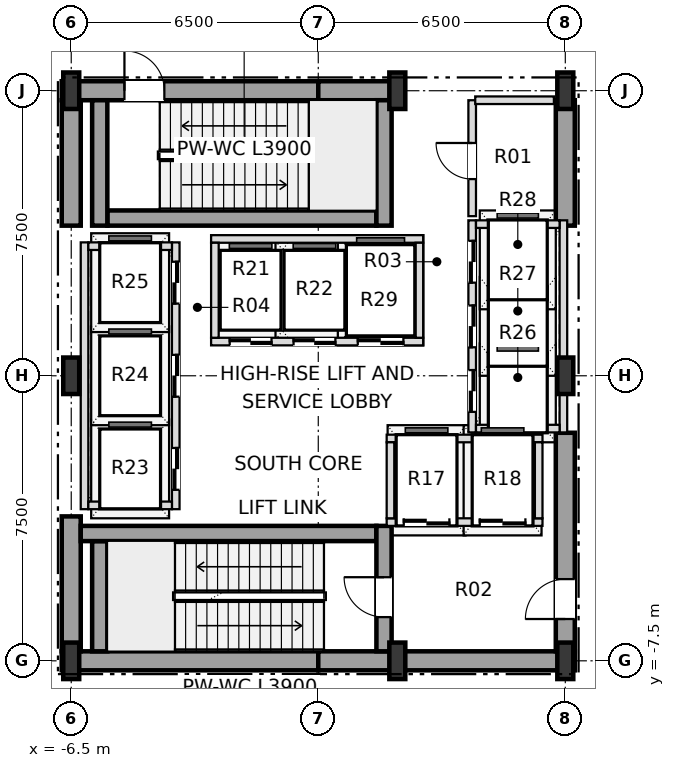
"""IFC4 building model, lengths in metres.
Left out: names, types, materials, properties, quantities, classifications, styles, units other than length and angle.
Written with IfcOpenShell. Run it as: python <this file> out.ifc"""

import sys

from ifc_helpers import new_model, si_unit, direction, frame, frame_2d, origin, origin_2d, place, context, subcontext, project, spatial, rectangle, i_section, extrude, element, fill, save


model = new_model("IFC4")
c1 = context("Model", 3, precision=1e-05, world=origin(), true_north=direction((0.0, 1.0)))
c2 = subcontext(c1, "Body", "Model", "MODEL_VIEW")
j1 = project(units=[si_unit("LENGTHUNIT", "METRE"), si_unit("PLANEANGLEUNIT", "RADIAN")], contexts=[c1])
p1 = place(None, origin())
s1 = spatial("IfcSite", under=j1, at=p1, CompositionType="ELEMENT")
p2 = place(p1, origin())
s2 = spatial("IfcBuilding", under=s1, at=p2, CompositionType="ELEMENT")
p3 = place(p2, frame((0.0, 0.0, 16.8)))
s3 = spatial("IfcBuildingStorey", under=s2, at=p3, CompositionType="ELEMENT", Elevation=16.8)
for number, where, z_axis, x_axis in (
    (1, (-6.5, -7.5, 0.0), (0.0, 0.0, 1.0), (1.0, 0.0, 0.0)),
    (2, (2.08, -7.5, 0.0), (0.0, 0.0, 1.0), (1.0, 0.0, 0.0)),
    (3, (6.5, -7.5, 0.0), (0.0, 0.0, 1.0), (1.0, 0.0, 0.0)),
    (4, (-6.5, 0.0, 0.0), (0.0, 0.0, 1.0), (1.0, 0.0, 0.0)),
    (5, (6.5, 0.0, 0.0), (0.0, 0.0, 1.0), (1.0, 0.0, 0.0)),
    (6, (-6.5, 7.5, 0.0), (0.0, 0.0, 1.0), (1.0, 0.0, 0.0)),
    (7, (2.08, 7.5, 0.0), (0.0, 0.0, 1.0), (1.0, 0.0, 0.0)),
    (8, (6.5, 7.5, 0.0), (0.0, 0.0, 1.0), (1.0, 0.0, 0.0)),
):
    element("IfcColumn", number, at=place(p3, frame(where, z_axis=z_axis, x_axis=x_axis)), inside=s3, PredefinedType="COLUMN", context=c2, shape_type="SweptSolid", body=[
        extrude(i_section(OverallWidth=0.42, OverallDepth=0.96, WebThickness=0.022, FlangeThickness=0.034, at=origin_2d()), origin(), (0.0, 0.0, 1.0), 5.4),
    ])
for number, where, z_axis, x_axis in (
    (9, (-6.75, -7.5, 0.0), (0.0, 0.0, 1.0), (1.0, 0.0, 0.0)),
    (10, (0.0, -7.5, 0.0), (0.0, 0.0, 1.0), (1.0, 0.0, 0.0)),
):
    element("IfcWall", number, at=place(p3, frame(where, z_axis=z_axis, x_axis=x_axis)), inside=s3, PredefinedType="SHEAR", context=c2, shape_type="SweptSolid", body=[
        extrude(rectangle(XDim=6.75, YDim=0.5, at=frame_2d((3.375, 0.0))), origin(), (0.0, 0.0, 1.0), 5.12),
    ])
p4 = place(p3, frame((-6.75, 7.5, 0.0), z_axis=(0.0, 0.0, 1.0), x_axis=(1.0, 0.0, 0.0)))
e11 = element("IfcWall", 11, at=p4, inside=s3, PredefinedType="SHEAR", context=c2, shape_type="SweptSolid", body=[
    extrude(rectangle(XDim=6.75, YDim=0.5, at=frame_2d((3.375, 0.0))), origin(), (0.0, 0.0, 1.0), 5.12),
])
p5 = place(p4, frame((1.65, 0.0, 0.0)))
e12 = element("IfcOpeningElement", 12, at=p5, cuts=e11, PredefinedType="OPENING", context=c2, shape_type="SweptSolid", body=[
    extrude(rectangle(XDim=1.05, YDim=2.15, at=frame_2d((0.525, 1.075))), frame((0.0, 0.26, 0.0), z_axis=(0.0, -1.0, 0.0), x_axis=(1.0, 0.0, 0.0)), (0.0, 0.0, 1.0), 0.52),
])
p6 = place(p3, frame((0.0, 7.5, 0.0), z_axis=(0.0, 0.0, 1.0), x_axis=(1.0, 0.0, 0.0)))
e13 = element("IfcWall", 13, at=p6, inside=s3, PredefinedType="SHEAR", context=c2, shape_type="SweptSolid", body=[
    extrude(rectangle(XDim=2.08, YDim=0.5, at=frame_2d((1.04, 0.0))), origin(), (0.0, 0.0, 1.0), 5.12),
])
p7 = place(p3, frame((-6.5, -7.25, 0.0), z_axis=(0.0, 0.0, 1.0), x_axis=(0.0, 1.0, 0.0)))
e14 = element("IfcWall", 14, at=p7, inside=s3, PredefinedType="SHEAR", context=c2, shape_type="SweptSolid", body=[
    extrude(rectangle(XDim=3.55, YDim=0.5, at=frame_2d((1.775, 0.0))), origin(), (0.0, 0.0, 1.0), 5.12),
])
p8 = place(p3, frame((-6.5, 3.95, 0.0), z_axis=(0.0, 0.0, 1.0), x_axis=(0.0, 1.0, 0.0)))
e15 = element("IfcWall", 15, at=p8, inside=s3, PredefinedType="SHEAR", context=c2, shape_type="SweptSolid", body=[
    extrude(rectangle(XDim=3.3, YDim=0.5, at=frame_2d((1.65, 0.0))), origin(), (0.0, 0.0, 1.0), 5.12),
])
p9 = place(p3, frame((6.5, -7.25, 0.0), z_axis=(0.0, 0.0, 1.0), x_axis=(0.0, 1.0, 0.0)))
e16 = element("IfcWall", 16, at=p9, inside=s3, PredefinedType="SHEAR", context=c2, shape_type="SweptSolid", body=[
    extrude(rectangle(XDim=5.75, YDim=0.5, at=frame_2d((2.875, 0.0))), origin(), (0.0, 0.0, 1.0), 5.12),
])
p10 = place(p9, frame((0.85, 0.0, 0.0)))
e17 = element("IfcOpeningElement", 17, at=p10, cuts=e16, PredefinedType="OPENING", context=c2, shape_type="SweptSolid", body=[
    extrude(rectangle(XDim=1.05, YDim=2.15, at=frame_2d((0.525, 1.075))), frame((0.0, 0.26, 0.0), z_axis=(0.0, -1.0, 0.0), x_axis=(1.0, 0.0, 0.0)), (0.0, 0.0, 1.0), 0.52),
])
p11 = place(p3, frame((6.5, 3.95, 0.0), z_axis=(0.0, 0.0, 1.0), x_axis=(0.0, 1.0, 0.0)))
e18 = element("IfcWall", 18, at=p11, inside=s3, PredefinedType="SHEAR", context=c2, shape_type="SweptSolid", body=[
    extrude(rectangle(XDim=3.3, YDim=0.5, at=frame_2d((1.65, 0.0))), origin(), (0.0, 0.0, 1.0), 5.12),
])
p12 = place(p3, frame((-5.75, -7.25, 0.0), z_axis=(0.0, 0.0, 1.0), x_axis=(0.0, 1.0, 0.0)))
e19 = element("IfcWall", 19, at=p12, inside=s3, PredefinedType="SHEAR", context=c2, shape_type="SweptSolid", body=[
    extrude(rectangle(XDim=2.9, YDim=0.4, at=frame_2d((1.45, 0.0))), origin(), (0.0, 0.0, 1.0), 5.12),
])
p13 = place(p3, frame((-6.25, -4.15, 0.0), z_axis=(0.0, 0.0, 1.0), x_axis=(1.0, 0.0, 0.0)))
e20 = element("IfcWall", 20, at=p13, inside=s3, PredefinedType="SHEAR", context=c2, shape_type="SweptSolid", body=[
    extrude(rectangle(XDim=7.78, YDim=0.4, at=frame_2d((3.89, 0.0))), origin(), (0.0, 0.0, 1.0), 5.12),
])
p14 = place(p3, frame((1.73, -7.25, 0.0), z_axis=(0.0, 0.0, 1.0), x_axis=(0.0, 1.0, 0.0)))
e21 = element("IfcWall", 21, at=p14, inside=s3, PredefinedType="SHEAR", context=c2, shape_type="SweptSolid", body=[
    extrude(rectangle(XDim=3.3, YDim=0.4, at=frame_2d((1.65, 0.0))), origin(), (0.0, 0.0, 1.0), 5.12),
])
p15 = place(p14, frame((0.9, 0.0, 0.0)))
e22 = element("IfcOpeningElement", 22, at=p15, cuts=e21, PredefinedType="OPENING", context=c2, shape_type="SweptSolid", body=[
    extrude(rectangle(XDim=1.05, YDim=2.15, at=frame_2d((0.525, 1.075))), frame((0.0, 0.21, 0.0), z_axis=(0.0, -1.0, 0.0), x_axis=(1.0, 0.0, 0.0)), (0.0, 0.0, 1.0), 0.42),
])
p16 = place(p3, frame((-5.55, 4.15, 0.0), z_axis=(0.0, 0.0, 1.0), x_axis=(1.0, 0.0, 0.0)))
e23 = element("IfcWall", 23, at=p16, inside=s3, PredefinedType="SHEAR", context=c2, shape_type="SweptSolid", body=[
    extrude(rectangle(XDim=7.08, YDim=0.4, at=frame_2d((3.54, 0.0))), origin(), (0.0, 0.0, 1.0), 5.12),
])
for number, where, z_axis, x_axis in (
    (24, (1.73, 3.95, 0.0), (0.0, 0.0, 1.0), (0.0, 1.0, 0.0)),
    (25, (-5.75, 3.95, 0.0), (0.0, 0.0, 1.0), (0.0, 1.0, 0.0)),
):
    element("IfcWall", number, at=place(p3, frame(where, z_axis=z_axis, x_axis=x_axis)), inside=s3, PredefinedType="SHEAR", context=c2, shape_type="SweptSolid", body=[
        extrude(rectangle(XDim=3.3, YDim=0.4, at=frame_2d((1.65, 0.0))), origin(), (0.0, 0.0, 1.0), 5.12),
    ])
p17 = place(p3, frame((-3.75, -3.51, 0.0), z_axis=(0.0, 0.0, 1.0), x_axis=(0.0, 1.0, 0.0)))
e26 = element("IfcWall", 26, at=p17, inside=s3, PredefinedType="SOLIDWALL", context=c2, shape_type="SweptSolid", body=[
    extrude(rectangle(XDim=7.02, YDim=0.2, at=frame_2d((3.51, 0.0))), origin(), (0.0, 0.0, 1.0), 5.12),
])
p18 = place(p17, frame((0.51, 0.0, 0.0)))
e27 = element("IfcOpeningElement", 27, at=p18, cuts=e26, PredefinedType="OPENING", context=c2, shape_type="SweptSolid", body=[
    extrude(rectangle(XDim=1.1, YDim=2.15, at=frame_2d((0.55, 1.075))), frame((0.0, 0.11, 0.0), z_axis=(0.0, -1.0, 0.0), x_axis=(1.0, 0.0, 0.0)), (0.0, 0.0, 1.0), 0.22),
])
p19 = place(p17, frame((2.96, 0.0, 0.0)))
e28 = element("IfcOpeningElement", 28, at=p19, cuts=e26, PredefinedType="OPENING", context=c2, shape_type="SweptSolid", body=[
    extrude(rectangle(XDim=1.1, YDim=2.15, at=frame_2d((0.55, 1.075))), frame((0.0, 0.11, 0.0), z_axis=(0.0, -1.0, 0.0), x_axis=(1.0, 0.0, 0.0)), (0.0, 0.0, 1.0), 0.22),
])
p20 = place(p17, frame((5.41, 0.0, 0.0)))
e29 = element("IfcOpeningElement", 29, at=p20, cuts=e26, PredefinedType="OPENING", context=c2, shape_type="SweptSolid", body=[
    extrude(rectangle(XDim=1.1, YDim=2.15, at=frame_2d((0.55, 1.075))), frame((0.0, 0.11, 0.0), z_axis=(0.0, -1.0, 0.0), x_axis=(1.0, 0.0, 0.0)), (0.0, 0.0, 1.0), 0.22),
])
p21 = place(p3, frame((-6.15, -3.51, 0.0), z_axis=(0.0, 0.0, 1.0), x_axis=(0.0, 1.0, 0.0)))
e30 = element("IfcWall", 30, at=p21, inside=s3, PredefinedType="SOLIDWALL", context=c2, shape_type="SweptSolid", body=[
    extrude(rectangle(XDim=7.02, YDim=0.2, at=frame_2d((3.51, 0.0))), origin(), (0.0, 0.0, 1.0), 5.12),
])
for number, where, z_axis, x_axis in (
    (31, (-6.05, -3.41, 0.0), (0.0, 0.0, 1.0), (1.0, 0.0, 0.0)),
    (32, (-6.05, 3.41, 0.0), (0.0, 0.0, 1.0), (1.0, 0.0, 0.0)),
):
    element("IfcWall", number, at=place(p3, frame(where, z_axis=z_axis, x_axis=x_axis)), inside=s3, PredefinedType="SOLIDWALL", context=c2, shape_type="SweptSolid", body=[
        extrude(rectangle(XDim=2.2, YDim=0.2, at=frame_2d((1.1, 0.0))), origin(), (0.0, 0.0, 1.0), 5.12),
    ])
p22 = place(p3, frame((4.05, -1.49, 0.0), z_axis=(0.0, 0.0, 1.0), x_axis=(0.0, 1.0, 0.0)))
e33 = element("IfcWall", 33, at=p22, inside=s3, PredefinedType="SOLIDWALL", context=c2, shape_type="SweptSolid", body=[
    extrude(rectangle(XDim=5.58, YDim=0.2, at=frame_2d((2.79, 0.0))), origin(), (0.0, 0.0, 1.0), 5.12),
])
p23 = place(p22, frame((0.54, 0.0, 0.0)))
e34 = element("IfcOpeningElement", 34, at=p23, cuts=e33, PredefinedType="OPENING", context=c2, shape_type="SweptSolid", body=[
    extrude(rectangle(XDim=1.1, YDim=2.15, at=frame_2d((0.55, 1.075))), frame((0.0, 0.11, 0.0), z_axis=(0.0, -1.0, 0.0), x_axis=(1.0, 0.0, 0.0)), (0.0, 0.0, 1.0), 0.22),
])
p24 = place(p22, frame((2.24, 0.0, 0.0)))
e35 = element("IfcOpeningElement", 35, at=p24, cuts=e33, PredefinedType="OPENING", context=c2, shape_type="SweptSolid", body=[
    extrude(rectangle(XDim=1.1, YDim=2.15, at=frame_2d((0.55, 1.075))), frame((0.0, 0.11, 0.0), z_axis=(0.0, -1.0, 0.0), x_axis=(1.0, 0.0, 0.0)), (0.0, 0.0, 1.0), 0.22),
])
p25 = place(p22, frame((3.94, 0.0, 0.0)))
e36 = element("IfcOpeningElement", 36, at=p25, cuts=e33, PredefinedType="OPENING", context=c2, shape_type="SweptSolid", body=[
    extrude(rectangle(XDim=1.1, YDim=2.15, at=frame_2d((0.55, 1.075))), frame((0.0, 0.11, 0.0), z_axis=(0.0, -1.0, 0.0), x_axis=(1.0, 0.0, 0.0)), (0.0, 0.0, 1.0), 0.22),
])
p26 = place(p3, frame((6.45, -1.49, 0.0), z_axis=(0.0, 0.0, 1.0), x_axis=(0.0, 1.0, 0.0)))
e37 = element("IfcWall", 37, at=p26, inside=s3, PredefinedType="SOLIDWALL", context=c2, shape_type="SweptSolid", body=[
    extrude(rectangle(XDim=5.58, YDim=0.2, at=frame_2d((2.79, 0.0))), origin(), (0.0, 0.0, 1.0), 4.41),
])
for number, where, z_axis, x_axis in (
    (38, (4.15, -1.39, 0.0), (0.0, 0.0, 1.0), (1.0, 0.0, 0.0)),
    (39, (4.15, 3.99, 0.0), (0.0, 0.0, 1.0), (1.0, 0.0, 0.0)),
):
    element("IfcWall", number, at=place(p3, frame(where, z_axis=z_axis, x_axis=x_axis)), inside=s3, PredefinedType="SOLIDWALL", context=c2, shape_type="SweptSolid", body=[
        extrude(rectangle(XDim=2.2, YDim=0.2, at=frame_2d((1.1, 0.0))), origin(), (0.0, 0.0, 1.0), 5.12),
    ])
p27 = place(p3, frame((-2.82, 0.9, 0.0), z_axis=(0.0, 0.0, 1.0), x_axis=(1.0, 0.0, 0.0)))
e40 = element("IfcWall", 40, at=p27, inside=s3, PredefinedType="SOLIDWALL", context=c2, shape_type="SweptSolid", body=[
    extrude(rectangle(XDim=5.58, YDim=0.2, at=frame_2d((2.79, 0.0))), origin(), (0.0, 0.0, 1.0), 5.12),
])
p28 = place(p27, frame((0.49, 0.0, 0.0)))
e41 = element("IfcOpeningElement", 41, at=p28, cuts=e40, PredefinedType="OPENING", context=c2, shape_type="SweptSolid", body=[
    extrude(rectangle(XDim=1.1, YDim=2.15, at=frame_2d((0.55, 1.075))), frame((0.0, 0.11, 0.0), z_axis=(0.0, -1.0, 0.0), x_axis=(1.0, 0.0, 0.0)), (0.0, 0.0, 1.0), 0.22),
])
p29 = place(p27, frame((2.17, 0.0, 0.0)))
e42 = element("IfcOpeningElement", 42, at=p29, cuts=e40, PredefinedType="OPENING", context=c2, shape_type="SweptSolid", body=[
    extrude(rectangle(XDim=1.1, YDim=2.15, at=frame_2d((0.55, 1.075))), frame((0.0, 0.11, 0.0), z_axis=(0.0, -1.0, 0.0), x_axis=(1.0, 0.0, 0.0)), (0.0, 0.0, 1.0), 0.22),
])
p30 = place(p27, frame((3.86, 0.0, 0.0)))
e43 = element("IfcOpeningElement", 43, at=p30, cuts=e40, PredefinedType="OPENING", context=c2, shape_type="SweptSolid", body=[
    extrude(rectangle(XDim=1.2, YDim=2.2, at=frame_2d((0.6, 1.1))), frame((0.0, 0.11, 0.0), z_axis=(0.0, -1.0, 0.0), x_axis=(1.0, 0.0, 0.0)), (0.0, 0.0, 1.0), 0.22),
])
p31 = place(p3, frame((-2.82, 3.6, 0.0), z_axis=(0.0, 0.0, 1.0), x_axis=(1.0, 0.0, 0.0)))
e44 = element("IfcWall", 44, at=p31, inside=s3, PredefinedType="SOLIDWALL", context=c2, shape_type="SweptSolid", body=[
    extrude(rectangle(XDim=5.58, YDim=0.2, at=frame_2d((2.79, 0.0))), origin(), (0.0, 0.0, 1.0), 5.12),
])
for number, where, z_axis, x_axis in (
    (45, (-2.72, 1.0, 0.0), (0.0, 0.0, 1.0), (0.0, 1.0, 0.0)),
    (46, (2.66, 1.0, 0.0), (0.0, 0.0, 1.0), (0.0, 1.0, 0.0)),
):
    element("IfcWall", number, at=place(p3, frame(where, z_axis=z_axis, x_axis=x_axis)), inside=s3, PredefinedType="SOLIDWALL", context=c2, shape_type="SweptSolid", body=[
        extrude(rectangle(XDim=2.5, YDim=0.2, at=frame_2d((1.25, 0.0))), origin(), (0.0, 0.0, 1.0), 5.12),
    ])
p32 = place(p3, frame((1.8, -3.85, 0.0), z_axis=(0.0, 0.0, 1.0), x_axis=(1.0, 0.0, 0.0)))
e47 = element("IfcWall", 47, at=p32, inside=s3, PredefinedType="SOLIDWALL", context=c2, shape_type="SweptSolid", body=[
    extrude(rectangle(XDim=4.1, YDim=0.2, at=frame_2d((2.05, 0.0))), origin(), (0.0, 0.0, 1.0), 5.12),
])
p33 = place(p32, frame((0.45, 0.0, 0.0)))
e48 = element("IfcOpeningElement", 48, at=p33, cuts=e47, PredefinedType="OPENING", context=c2, shape_type="SweptSolid", body=[
    extrude(rectangle(XDim=1.2, YDim=2.2, at=frame_2d((0.6, 1.1))), frame((0.0, 0.11, 0.0), z_axis=(0.0, -1.0, 0.0), x_axis=(1.0, 0.0, 0.0)), (0.0, 0.0, 1.0), 0.22),
])
p34 = place(p32, frame((2.45, 0.0, 0.0)))
e49 = element("IfcOpeningElement", 49, at=p34, cuts=e47, PredefinedType="OPENING", context=c2, shape_type="SweptSolid", body=[
    extrude(rectangle(XDim=1.2, YDim=2.2, at=frame_2d((0.6, 1.1))), frame((0.0, 0.11, 0.0), z_axis=(0.0, -1.0, 0.0), x_axis=(1.0, 0.0, 0.0)), (0.0, 0.0, 1.0), 0.22),
])
p35 = place(p3, frame((1.8, -1.65, 0.0), z_axis=(0.0, 0.0, 1.0), x_axis=(1.0, 0.0, 0.0)))
e50 = element("IfcWall", 50, at=p35, inside=s3, PredefinedType="SOLIDWALL", context=c2, shape_type="SweptSolid", body=[
    extrude(rectangle(XDim=4.1, YDim=0.2, at=frame_2d((2.05, 0.0))), origin(), (0.0, 0.0, 1.0), 5.12),
])
for number, where, z_axis, x_axis in (
    (51, (1.9, -3.75, 0.0), (0.0, 0.0, 1.0), (0.0, 1.0, 0.0)),
    (52, (5.8, -3.75, 0.0), (0.0, 0.0, 1.0), (0.0, 1.0, 0.0)),
):
    element("IfcWall", number, at=place(p3, frame(where, z_axis=z_axis, x_axis=x_axis)), inside=s3, PredefinedType="SOLIDWALL", context=c2, shape_type="SweptSolid", body=[
        extrude(rectangle(XDim=2.0, YDim=0.2, at=frame_2d((1.0, 0.0))), origin(), (0.0, 0.0, 1.0), 5.12),
    ])
p36 = place(p3, frame((4.05, 4.2, 0.0), z_axis=(0.0, 0.0, 1.0), x_axis=(0.0, 1.0, 0.0)))
e53 = element("IfcWall", 53, at=p36, inside=s3, PredefinedType="SOLIDWALL", context=c2, shape_type="SweptSolid", body=[
    extrude(rectangle(XDim=3.05, YDim=0.2, at=frame_2d((1.525, 0.0))), origin(), (0.0, 0.0, 1.0), 5.12),
])
p37 = place(p36, frame((0.975, 0.0, 0.0)))
e54 = element("IfcOpeningElement", 54, at=p37, cuts=e53, PredefinedType="OPENING", context=c2, shape_type="SweptSolid", body=[
    extrude(rectangle(XDim=0.95, YDim=2.15, at=frame_2d((0.475, 1.075))), frame((0.0, 0.11, 0.0), z_axis=(0.0, -1.0, 0.0), x_axis=(1.0, 0.0, 0.0)), (0.0, 0.0, 1.0), 0.22),
])
p38 = place(p3, frame((4.13, 7.25, 0.0), z_axis=(0.0, 0.0, 1.0), x_axis=(1.0, 0.0, 0.0)))
e55 = element("IfcWall", 55, at=p38, inside=s3, PredefinedType="SOLIDWALL", context=c2, shape_type="SweptSolid", body=[
    extrude(rectangle(XDim=2.07, YDim=0.2, at=frame_2d((1.035, 0.0))), origin(), (0.0, 0.0, 1.0), 4.41),
])
p39 = place(p10, origin())
e56 = element("IfcDoor", 56, at=p39, inside=s3, OperationType="SINGLE_SWING_LEFT", PredefinedType="DOOR", context=c2, shape_type="SweptSolid", body=[
    extrude(rectangle(XDim=1.05, YDim=2.15, at=frame_2d((0.525, 1.075))), frame((0.0, 0.025, 0.0), z_axis=(0.0, -1.0, 0.0), x_axis=(1.0, 0.0, 0.0)), (0.0, 0.0, 1.0), 0.05),
])
fill(e17, e56)
p40 = place(p15, origin())
e57 = element("IfcDoor", 57, at=p40, inside=s3, OperationType="SINGLE_SWING_RIGHT", PredefinedType="DOOR", context=c2, shape_type="SweptSolid", body=[
    extrude(rectangle(XDim=1.05, YDim=2.15, at=frame_2d((0.525, 1.075))), frame((0.0, 0.025, 0.0), z_axis=(0.0, -1.0, 0.0), x_axis=(1.0, 0.0, 0.0)), (0.0, 0.0, 1.0), 0.05),
])
fill(e22, e57)
p41 = place(p5, origin())
e58 = element("IfcDoor", 58, at=p41, inside=s3, OperationType="SINGLE_SWING_LEFT", PredefinedType="DOOR", context=c2, shape_type="SweptSolid", body=[
    extrude(rectangle(XDim=1.05, YDim=2.15, at=frame_2d((0.525, 1.075))), frame((0.0, 0.025, 0.0), z_axis=(0.0, -1.0, 0.0), x_axis=(1.0, 0.0, 0.0)), (0.0, 0.0, 1.0), 0.05),
])
fill(e12, e58)
p42 = place(p18, origin())
e59 = element("IfcDoor", 59, at=p42, inside=s3, OperationType="DOUBLE_DOOR_SLIDING", PredefinedType="DOOR", context=c2, shape_type="SweptSolid", body=[
    extrude(rectangle(XDim=1.1, YDim=2.15, at=frame_2d((0.55, 1.075))), frame((0.0, 0.025, 0.0), z_axis=(0.0, -1.0, 0.0), x_axis=(1.0, 0.0, 0.0)), (0.0, 0.0, 1.0), 0.05),
])
fill(e27, e59)
p43 = place(p19, origin())
e60 = element("IfcDoor", 60, at=p43, inside=s3, OperationType="DOUBLE_DOOR_SLIDING", PredefinedType="DOOR", context=c2, shape_type="SweptSolid", body=[
    extrude(rectangle(XDim=1.1, YDim=2.15, at=frame_2d((0.55, 1.075))), frame((0.0, 0.025, 0.0), z_axis=(0.0, -1.0, 0.0), x_axis=(1.0, 0.0, 0.0)), (0.0, 0.0, 1.0), 0.05),
])
fill(e28, e60)
p44 = place(p20, origin())
e61 = element("IfcDoor", 61, at=p44, inside=s3, OperationType="DOUBLE_DOOR_SLIDING", PredefinedType="DOOR", context=c2, shape_type="SweptSolid", body=[
    extrude(rectangle(XDim=1.1, YDim=2.15, at=frame_2d((0.55, 1.075))), frame((0.0, 0.025, 0.0), z_axis=(0.0, -1.0, 0.0), x_axis=(1.0, 0.0, 0.0)), (0.0, 0.0, 1.0), 0.05),
])
fill(e29, e61)
p45 = place(p23, origin())
e62 = element("IfcDoor", 62, at=p45, inside=s3, OperationType="DOUBLE_DOOR_SLIDING", PredefinedType="DOOR", context=c2, shape_type="SweptSolid", body=[
    extrude(rectangle(XDim=1.1, YDim=2.15, at=frame_2d((0.55, 1.075))), frame((0.0, 0.025, 0.0), z_axis=(0.0, -1.0, 0.0), x_axis=(1.0, 0.0, 0.0)), (0.0, 0.0, 1.0), 0.05),
])
fill(e34, e62)
p46 = place(p24, origin())
e63 = element("IfcDoor", 63, at=p46, inside=s3, OperationType="DOUBLE_DOOR_SLIDING", PredefinedType="DOOR", context=c2, shape_type="SweptSolid", body=[
    extrude(rectangle(XDim=1.1, YDim=2.15, at=frame_2d((0.55, 1.075))), frame((0.0, 0.025, 0.0), z_axis=(0.0, -1.0, 0.0), x_axis=(1.0, 0.0, 0.0)), (0.0, 0.0, 1.0), 0.05),
])
fill(e35, e63)
p47 = place(p25, origin())
e64 = element("IfcDoor", 64, at=p47, inside=s3, OperationType="DOUBLE_DOOR_SLIDING", PredefinedType="DOOR", context=c2, shape_type="SweptSolid", body=[
    extrude(rectangle(XDim=1.1, YDim=2.15, at=frame_2d((0.55, 1.075))), frame((0.0, 0.025, 0.0), z_axis=(0.0, -1.0, 0.0), x_axis=(1.0, 0.0, 0.0)), (0.0, 0.0, 1.0), 0.05),
])
fill(e36, e64)
p48 = place(p28, origin())
e65 = element("IfcDoor", 65, at=p48, inside=s3, OperationType="DOUBLE_DOOR_SLIDING", PredefinedType="DOOR", context=c2, shape_type="SweptSolid", body=[
    extrude(rectangle(XDim=1.1, YDim=2.15, at=frame_2d((0.55, 1.075))), frame((0.0, 0.025, 0.0), z_axis=(0.0, -1.0, 0.0), x_axis=(1.0, 0.0, 0.0)), (0.0, 0.0, 1.0), 0.05),
])
fill(e41, e65)
p49 = place(p29, origin())
e66 = element("IfcDoor", 66, at=p49, inside=s3, OperationType="DOUBLE_DOOR_SLIDING", PredefinedType="DOOR", context=c2, shape_type="SweptSolid", body=[
    extrude(rectangle(XDim=1.1, YDim=2.15, at=frame_2d((0.55, 1.075))), frame((0.0, 0.025, 0.0), z_axis=(0.0, -1.0, 0.0), x_axis=(1.0, 0.0, 0.0)), (0.0, 0.0, 1.0), 0.05),
])
fill(e42, e66)
p50 = place(p30, origin())
e67 = element("IfcDoor", 67, at=p50, inside=s3, OperationType="DOUBLE_DOOR_SLIDING", PredefinedType="DOOR", context=c2, shape_type="SweptSolid", body=[
    extrude(rectangle(XDim=1.2, YDim=2.2, at=frame_2d((0.6, 1.1))), frame((0.0, 0.025, 0.0), z_axis=(0.0, -1.0, 0.0), x_axis=(1.0, 0.0, 0.0)), (0.0, 0.0, 1.0), 0.05),
])
fill(e43, e67)
p51 = place(p33, origin())
e68 = element("IfcDoor", 68, at=p51, inside=s3, OperationType="DOUBLE_DOOR_SLIDING", PredefinedType="DOOR", context=c2, shape_type="SweptSolid", body=[
    extrude(rectangle(XDim=1.2, YDim=2.2, at=frame_2d((0.6, 1.1))), frame((0.0, 0.025, 0.0), z_axis=(0.0, -1.0, 0.0), x_axis=(1.0, 0.0, 0.0)), (0.0, 0.0, 1.0), 0.05),
])
fill(e48, e68)
p52 = place(p34, origin())
e69 = element("IfcDoor", 69, at=p52, inside=s3, OperationType="DOUBLE_DOOR_SLIDING", PredefinedType="DOOR", context=c2, shape_type="SweptSolid", body=[
    extrude(rectangle(XDim=1.2, YDim=2.2, at=frame_2d((0.6, 1.1))), frame((0.0, 0.025, 0.0), z_axis=(0.0, -1.0, 0.0), x_axis=(1.0, 0.0, 0.0)), (0.0, 0.0, 1.0), 0.05),
])
fill(e49, e69)
p53 = place(p37, origin())
e70 = element("IfcDoor", 70, at=p53, inside=s3, OperationType="SINGLE_SWING_RIGHT", PredefinedType="DOOR", context=c2, shape_type="SweptSolid", body=[
    extrude(rectangle(XDim=0.95, YDim=2.15, at=frame_2d((0.475, 1.075))), frame((0.0, 0.025, 0.0), z_axis=(0.0, -1.0, 0.0), x_axis=(1.0, 0.0, 0.0)), (0.0, 0.0, 1.0), 0.05),
])
fill(e54, e70)
save(model, sys.argv[1])
